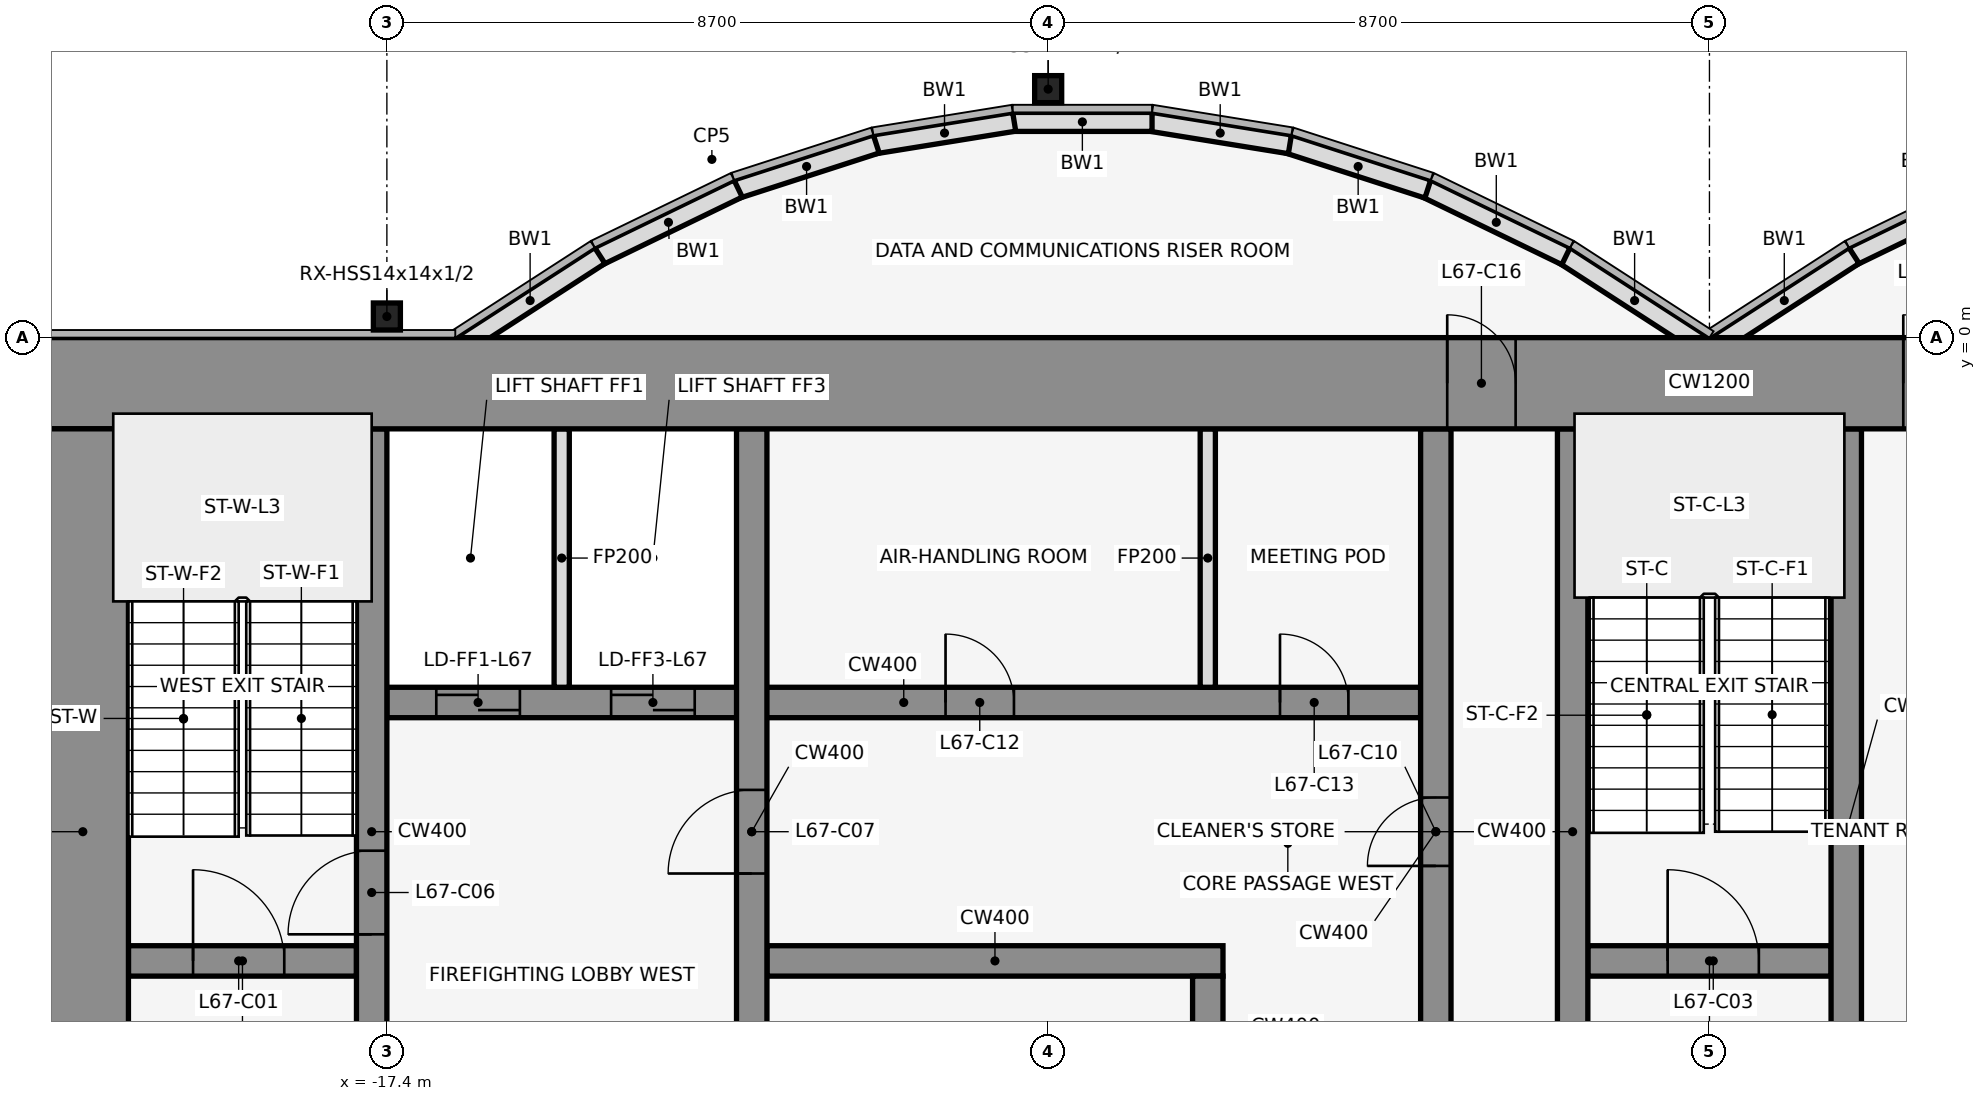
"""IFC4 building model, lengths in metres.
Left out: names, types, materials, properties, quantities, classifications, styles, units other than length and angle.
Written with IfcOpenShell. Run it as: python <this file> out.ifc"""

import sys

from ifc_helpers import new_model, si_unit, direction, frame, frame_2d, origin, origin_2d, place, context, subcontext, project, spatial, rectangle, hollow_rectangle, extrude, element, fill, save


model = new_model("IFC4")
c1 = context("Model", 3, precision=1e-05, world=origin(), true_north=direction((0.0, 1.0)))
c2 = subcontext(c1, "Body", "Model", "MODEL_VIEW")
j1 = project(units=[si_unit("LENGTHUNIT", "METRE"), si_unit("PLANEANGLEUNIT", "RADIAN")], contexts=[c1])
p1 = place(None, origin())
s1 = spatial("IfcSite", under=j1, at=p1, CompositionType="ELEMENT")
p2 = place(p1, origin())
s2 = spatial("IfcBuilding", under=s1, at=p2, CompositionType="ELEMENT")
p3 = place(p2, frame((0.0, 0.0, 297.5)))
s3 = spatial("IfcBuildingStorey", under=s2, at=p3, CompositionType="ELEMENT", Elevation=297.5)
for number, where, z_axis, x_axis in (
    (1, (-8.7, 3.269, 0.0), (0.0, 0.0, 1.0), (1.0, 0.0, 0.0)),
    (2, (-17.4, 0.278, 0.0), (0.0, 0.0, 1.0), (1.0, 0.0, 0.0)),
):
    element("IfcColumn", number, at=place(p3, frame(where, z_axis=z_axis, x_axis=x_axis)), inside=s3, PredefinedType="COLUMN", context=c2, shape_type="SweptSolid", body=[
        extrude(hollow_rectangle(XDim=0.356, YDim=0.356, WallThickness=0.012, at=origin_2d()), origin(), (0.0, 0.0, 1.0), 4.5),
    ])
p4 = place(p3, frame((3.721, 1.962, 0.0), z_axis=(0.0, 0.0, 1.0), x_axis=(-0.89982408427, -0.436252928206, 0.0)))
e3 = element("IfcWall", 3, at=p4, inside=s3, PredefinedType="STANDARD", context=c2, shape_type="SweptSolid", body=[
    extrude(rectangle(XDim=2.038, YDim=0.25, at=frame_2d((1.019, 0.0))), origin(), (0.0, 0.0, 1.0), 4.35),
])
for number, where, z_axis, x_axis in (
    (4, (1.901, 1.08, 0.0), (0.0, 0.0, 1.0), (-0.84, -0.543, 0.0)),
    (5, (-0.068, -0.105, 0.0), (0.0, 0.0, 1.0), (-0.84, 0.543, 0.0)),
):
    element("IfcWall", number, at=place(p3, frame(where, z_axis=z_axis, x_axis=x_axis)), inside=s3, PredefinedType="STANDARD", context=c2, shape_type="SweptSolid", body=[
        extrude(rectangle(XDim=2.183, YDim=0.25, at=frame_2d((1.091, 0.0))), origin(), (0.0, 0.0, 1.0), 4.35),
    ])
p5 = place(p3, frame((-1.888, 1.073, 0.0), z_axis=(0.0, 0.0, 1.0), x_axis=(-0.89982408427, 0.436252928206, 0.0)))
e6 = element("IfcWall", 6, at=p5, inside=s3, PredefinedType="STANDARD", context=c2, shape_type="SweptSolid", body=[
    extrude(rectangle(XDim=2.038, YDim=0.25, at=frame_2d((1.019, 0.0))), origin(), (0.0, 0.0, 1.0), 4.35),
])
p6 = place(p3, frame((-3.705, 1.955, 0.0), z_axis=(0.0, 0.0, 1.0), x_axis=(-0.951495806175, 0.307661714928, 0.0)))
e7 = element("IfcWall", 7, at=p6, inside=s3, PredefinedType="STANDARD", context=c2, shape_type="SweptSolid", body=[
    extrude(rectangle(XDim=1.927, YDim=0.25, at=frame_2d((0.963, 0.0))), origin(), (0.0, 0.0, 1.0), 4.35),
])
p7 = place(p3, frame((-5.52, 2.543, 0.0), z_axis=(0.0, 0.0, 1.0), x_axis=(-0.987181718931, 0.159600293885, 0.0)))
e8 = element("IfcWall", 8, at=p7, inside=s3, PredefinedType="STANDARD", context=c2, shape_type="SweptSolid", body=[
    extrude(rectangle(XDim=1.857, YDim=0.25, at=frame_2d((0.929, 0.0))), origin(), (0.0, 0.0, 1.0), 4.35),
])
p8 = place(p3, frame((-7.333, 2.838, 0.0), z_axis=(0.0, 0.0, 1.0), x_axis=(-1.0, 0.0, 0.0)))
e9 = element("IfcWall", 9, at=p8, inside=s3, PredefinedType="STANDARD", context=c2, shape_type="SweptSolid", body=[
    extrude(rectangle(XDim=1.833, YDim=0.25, at=frame_2d((0.917, 0.0))), origin(), (0.0, 0.0, 1.0), 4.35),
])
p9 = place(p3, frame((-9.147, 2.84, 0.0), z_axis=(0.0, 0.0, 1.0), x_axis=(-0.987181718931, -0.159600293885, 0.0)))
e10 = element("IfcWall", 10, at=p9, inside=s3, PredefinedType="STANDARD", context=c2, shape_type="SweptSolid", body=[
    extrude(rectangle(XDim=1.857, YDim=0.25, at=frame_2d((0.929, 0.0))), origin(), (0.0, 0.0, 1.0), 4.35),
])
p10 = place(p3, frame((-10.962, 2.548, 0.0), z_axis=(0.0, 0.0, 1.0), x_axis=(-0.951495806175, -0.307661714928, 0.0)))
e11 = element("IfcWall", 11, at=p10, inside=s3, PredefinedType="STANDARD", context=c2, shape_type="SweptSolid", body=[
    extrude(rectangle(XDim=1.927, YDim=0.25, at=frame_2d((0.963, 0.0))), origin(), (0.0, 0.0, 1.0), 4.35),
])
p11 = place(p3, frame((-12.779, 1.962, 0.0), z_axis=(0.0, 0.0, 1.0), x_axis=(-0.89982408427, -0.436252928206, 0.0)))
e12 = element("IfcWall", 12, at=p11, inside=s3, PredefinedType="STANDARD", context=c2, shape_type="SweptSolid", body=[
    extrude(rectangle(XDim=2.038, YDim=0.25, at=frame_2d((1.019, 0.0))), origin(), (0.0, 0.0, 1.0), 4.35),
])
p12 = place(p3, frame((-14.599, 1.08, 0.0), z_axis=(0.0, 0.0, 1.0), x_axis=(-0.83981312244, -0.542875602121, 0.0)))
e13 = element("IfcWall", 13, at=p12, inside=s3, PredefinedType="STANDARD", context=c2, shape_type="SweptSolid", body=[
    extrude(rectangle(XDim=2.183, YDim=0.25, at=frame_2d((1.091, 0.0))), origin(), (0.0, 0.0, 1.0), 4.35),
])
p13 = place(p3, frame((-20.8, -8.2, 0.0), z_axis=(0.0, 0.0, 1.0), x_axis=(1.0, 0.0, 0.0)))
e14 = element("IfcWall", 14, at=p13, inside=s3, PredefinedType="SHEAR", context=c2, shape_type="SweptSolid", body=[
    extrude(rectangle(XDim=3.0, YDim=0.4, at=frame_2d((1.5, 0.0))), origin(), (0.0, 0.0, 1.0), 4.5),
])
p14 = place(p13, frame((0.85, 0.0, 0.0)))
e15 = element("IfcOpeningElement", 15, at=p14, cuts=e14, PredefinedType="OPENING", context=c2, shape_type="SweptSolid", body=[
    extrude(rectangle(XDim=1.2, YDim=2.1, at=frame_2d((0.6, 1.05))), frame((0.0, 0.212, 0.0), z_axis=(0.0, -1.0, 0.0), x_axis=(1.0, 0.0, 0.0)), (0.0, 0.0, 1.0), 0.424),
])
p15 = place(p3, frame((-12.4, -8.2, 0.0), z_axis=(0.0, 0.0, 1.0), x_axis=(1.0, 0.0, 0.0)))
e16 = element("IfcWall", 16, at=p15, inside=s3, PredefinedType="SHEAR", context=c2, shape_type="SweptSolid", body=[
    extrude(rectangle(XDim=6.0, YDim=0.4, at=frame_2d((3.0, 0.0))), origin(), (0.0, 0.0, 1.0), 4.5),
])
p16 = place(p3, frame((-1.6, -8.2, 0.0), z_axis=(0.0, 0.0, 1.0), x_axis=(1.0, 0.0, 0.0)))
e17 = element("IfcWall", 17, at=p16, inside=s3, PredefinedType="SHEAR", context=c2, shape_type="SweptSolid", body=[
    extrude(rectangle(XDim=3.2, YDim=0.4, at=frame_2d((1.6, 0.0))), origin(), (0.0, 0.0, 1.0), 4.5),
])
p17 = place(p16, frame((1.05, 0.0, 0.0)))
e18 = element("IfcOpeningElement", 18, at=p17, cuts=e17, PredefinedType="OPENING", context=c2, shape_type="SweptSolid", body=[
    extrude(rectangle(XDim=1.2, YDim=2.1, at=frame_2d((0.6, 1.05))), frame((0.0, 0.212, 0.0), z_axis=(0.0, -1.0, 0.0), x_axis=(1.0, 0.0, 0.0)), (0.0, 0.0, 1.0), 0.424),
])
p18 = place(p3, frame((-17.4, -4.8, 0.0), z_axis=(0.0, 0.0, 1.0), x_axis=(1.0, 0.0, 0.0)))
e19 = element("IfcWall", 19, at=p18, inside=s3, PredefinedType="SHEAR", context=c2, shape_type="SweptSolid", body=[
    extrude(rectangle(XDim=13.6, YDim=0.4, at=frame_2d((6.8, 0.0))), origin(), (0.0, 0.0, 1.0), 4.5),
])
p19 = place(p18, frame((0.65, 0.0, 0.0)))
e20 = element("IfcOpeningElement", 20, at=p19, cuts=e19, PredefinedType="OPENING", context=c2, shape_type="SweptSolid", body=[
    extrude(rectangle(XDim=1.1, YDim=2.1, at=frame_2d((0.55, 1.05))), frame((0.0, 0.212, 0.0), z_axis=(0.0, -1.0, 0.0), x_axis=(1.0, 0.0, 0.0)), (0.0, 0.0, 1.0), 0.424),
])
p20 = place(p18, frame((2.95, 0.0, 0.0)))
e21 = element("IfcOpeningElement", 21, at=p20, cuts=e19, PredefinedType="OPENING", context=c2, shape_type="SweptSolid", body=[
    extrude(rectangle(XDim=1.1, YDim=2.1, at=frame_2d((0.55, 1.05))), frame((0.0, 0.212, 0.0), z_axis=(0.0, -1.0, 0.0), x_axis=(1.0, 0.0, 0.0)), (0.0, 0.0, 1.0), 0.424),
])
p21 = place(p18, frame((7.35, 0.0, 0.0)))
e22 = element("IfcOpeningElement", 22, at=p21, cuts=e19, PredefinedType="OPENING", context=c2, shape_type="SweptSolid", body=[
    extrude(rectangle(XDim=0.9, YDim=2.1, at=frame_2d((0.45, 1.05))), frame((0.0, 0.212, 0.0), z_axis=(0.0, -1.0, 0.0), x_axis=(1.0, 0.0, 0.0)), (0.0, 0.0, 1.0), 0.424),
])
p22 = place(p18, frame((11.75, 0.0, 0.0)))
e23 = element("IfcOpeningElement", 23, at=p22, cuts=e19, PredefinedType="OPENING", context=c2, shape_type="SweptSolid", body=[
    extrude(rectangle(XDim=0.9, YDim=2.1, at=frame_2d((0.45, 1.05))), frame((0.0, 0.212, 0.0), z_axis=(0.0, -1.0, 0.0), x_axis=(1.0, 0.0, 0.0)), (0.0, 0.0, 1.0), 0.424),
])
p23 = place(p3, frame((-17.6, -11.8, 0.0), z_axis=(0.0, 0.0, 1.0), x_axis=(0.0, 1.0, 0.0)))
e24 = element("IfcWall", 24, at=p23, inside=s3, PredefinedType="SHEAR", context=c2, shape_type="SweptSolid", body=[
    extrude(rectangle(XDim=10.6, YDim=0.4, at=frame_2d((5.3, 0.0))), origin(), (0.0, 0.0, 1.0), 4.5),
])
p24 = place(p23, frame((1.25, 0.0, 0.0)))
e25 = element("IfcOpeningElement", 25, at=p24, cuts=e24, PredefinedType="OPENING", context=c2, shape_type="SweptSolid", body=[
    extrude(rectangle(XDim=1.1, YDim=2.1, at=frame_2d((0.55, 1.05))), frame((0.0, 0.212, 0.0), z_axis=(0.0, -1.0, 0.0), x_axis=(1.0, 0.0, 0.0)), (0.0, 0.0, 1.0), 0.424),
])
p25 = place(p23, frame((3.95, 0.0, 0.0)))
e26 = element("IfcOpeningElement", 26, at=p25, cuts=e24, PredefinedType="OPENING", context=c2, shape_type="SweptSolid", body=[
    extrude(rectangle(XDim=1.1, YDim=2.1, at=frame_2d((0.55, 1.05))), frame((0.0, 0.212, 0.0), z_axis=(0.0, -1.0, 0.0), x_axis=(1.0, 0.0, 0.0)), (0.0, 0.0, 1.0), 0.424),
])
p26 = place(p3, frame((-15.1, -4.6, 0.0), z_axis=(0.0, 0.0, 1.0), x_axis=(0.0, 1.0, 0.0)))
e27 = element("IfcWall", 27, at=p26, inside=s3, PredefinedType="PARTITIONING", context=c2, shape_type="SweptSolid", body=[
    extrude(rectangle(XDim=3.4, YDim=0.2, at=frame_2d((1.7, 0.0))), origin(), (0.0, 0.0, 1.0), 3.418),
])
p27 = place(p3, frame((-12.6, -11.8, 0.0), z_axis=(0.0, 0.0, 1.0), x_axis=(0.0, 1.0, 0.0)))
e28 = element("IfcWall", 28, at=p27, inside=s3, PredefinedType="SHEAR", context=c2, shape_type="SweptSolid", body=[
    extrude(rectangle(XDim=10.6, YDim=0.4, at=frame_2d((5.3, 0.0))), origin(), (0.0, 0.0, 1.0), 4.5),
])
p28 = place(p27, frame((4.75, 0.0, 0.0)))
e29 = element("IfcOpeningElement", 29, at=p28, cuts=e28, PredefinedType="OPENING", context=c2, shape_type="SweptSolid", body=[
    extrude(rectangle(XDim=1.1, YDim=2.1, at=frame_2d((0.55, 1.05))), frame((0.0, 0.212, 0.0), z_axis=(0.0, -1.0, 0.0), x_axis=(1.0, 0.0, 0.0)), (0.0, 0.0, 1.0), 0.424),
])
p29 = place(p3, frame((-6.6, -11.8, 0.0), z_axis=(0.0, 0.0, 1.0), x_axis=(0.0, 1.0, 0.0)))
e30 = element("IfcWall", 30, at=p29, inside=s3, PredefinedType="SHEAR", context=c2, shape_type="SweptSolid", body=[
    extrude(rectangle(XDim=3.4, YDim=0.4, at=frame_2d((1.7, 0.0))), origin(), (0.0, 0.0, 1.0), 4.5),
])
p30 = place(p29, frame((1.25, 0.0, 0.0)))
e31 = element("IfcOpeningElement", 31, at=p30, cuts=e30, PredefinedType="OPENING", context=c2, shape_type="SweptSolid", body=[
    extrude(rectangle(XDim=0.9, YDim=2.1, at=frame_2d((0.45, 1.05))), frame((0.0, 0.212, 0.0), z_axis=(0.0, -1.0, 0.0), x_axis=(1.0, 0.0, 0.0)), (0.0, 0.0, 1.0), 0.424),
])
p31 = place(p3, frame((-6.6, -4.6, 0.0), z_axis=(0.0, 0.0, 1.0), x_axis=(0.0, 1.0, 0.0)))
e32 = element("IfcWall", 32, at=p31, inside=s3, PredefinedType="PARTITIONING", context=c2, shape_type="SweptSolid", body=[
    extrude(rectangle(XDim=3.4, YDim=0.2, at=frame_2d((1.7, 0.0))), origin(), (0.0, 0.0, 1.0), 3.418),
])
p32 = place(p3, frame((-3.6, -11.8, 0.0), z_axis=(0.0, 0.0, 1.0), x_axis=(0.0, 1.0, 0.0)))
e33 = element("IfcWall", 33, at=p32, inside=s3, PredefinedType="SHEAR", context=c2, shape_type="SweptSolid", body=[
    extrude(rectangle(XDim=10.6, YDim=0.4, at=frame_2d((5.3, 0.0))), origin(), (0.0, 0.0, 1.0), 4.5),
])
p33 = place(p32, frame((4.85, 0.0, 0.0)))
e34 = element("IfcOpeningElement", 34, at=p33, cuts=e33, PredefinedType="OPENING", context=c2, shape_type="SweptSolid", body=[
    extrude(rectangle(XDim=0.9, YDim=2.1, at=frame_2d((0.45, 1.05))), frame((0.0, 0.212, 0.0), z_axis=(0.0, -1.0, 0.0), x_axis=(1.0, 0.0, 0.0)), (0.0, 0.0, 1.0), 0.424),
])
for number, where, z_axis, x_axis in (
    (35, (-1.8, -11.8, 0.0), (0.0, 0.0, 1.0), (0.0, 1.0, 0.0)),
    (36, (1.8, -11.8, 0.0), (0.0, 0.0, 1.0), (0.0, 1.0, 0.0)),
):
    element("IfcWall", number, at=place(p3, frame(where, z_axis=z_axis, x_axis=x_axis)), inside=s3, PredefinedType="SHEAR", context=c2, shape_type="SweptSolid", body=[
        extrude(rectangle(XDim=10.6, YDim=0.4, at=frame_2d((5.3, 0.0))), origin(), (0.0, 0.0, 1.0), 4.5),
    ])
p34 = place(p3, frame((-22.0, -0.6, 0.0), z_axis=(0.0, 0.0, 1.0), x_axis=(1.0, 0.0, 0.0)))
e37 = element("IfcWall", 37, at=p34, inside=s3, PredefinedType="SHEAR", context=c2, shape_type="SweptSolid", body=[
    extrude(rectangle(XDim=44.0, YDim=1.2, at=frame_2d((22.0, 0.0))), origin(), (0.0, 0.0, 1.0), 4.5),
])
p35 = place(p34, frame((18.55, 0.0, 0.0)))
e38 = element("IfcOpeningElement", 38, at=p35, cuts=e37, PredefinedType="OPENING", context=c2, shape_type="SweptSolid", body=[
    extrude(rectangle(XDim=0.9, YDim=2.1, at=frame_2d((0.45, 1.05))), frame((0.0, 0.612, 0.0), z_axis=(0.0, -1.0, 0.0), x_axis=(1.0, 0.0, 0.0)), (0.0, 0.0, 1.0), 1.224),
])
p36 = place(p34, frame((24.55, 0.0, 0.0)))
e39 = element("IfcOpeningElement", 39, at=p36, cuts=e37, PredefinedType="OPENING", context=c2, shape_type="SweptSolid", body=[
    extrude(rectangle(XDim=0.9, YDim=2.1, at=frame_2d((0.45, 1.05))), frame((0.0, 0.612, 0.0), z_axis=(0.0, -1.0, 0.0), x_axis=(1.0, 0.0, 0.0)), (0.0, 0.0, 1.0), 1.224),
])
p37 = place(p3, frame((-21.4, -11.8, 0.0), z_axis=(0.0, 0.0, 1.0), x_axis=(0.0, 1.0, 0.0)))
e40 = element("IfcWall", 40, at=p37, inside=s3, PredefinedType="SHEAR", context=c2, shape_type="SweptSolid", body=[
    extrude(rectangle(XDim=10.6, YDim=1.2, at=frame_2d((5.3, 0.0))), origin(), (0.0, 0.0, 1.0), 4.5),
])
p38 = place(p14, origin())
e41 = element("IfcDoor", 41, at=p38, inside=s3, OperationType="SINGLE_SWING_LEFT", PredefinedType="DOOR", context=c2, shape_type="SweptSolid", body=[
    extrude(rectangle(XDim=1.2, YDim=2.1, at=frame_2d((0.6, 1.05))), frame((0.0, 0.025, 0.0), z_axis=(0.0, -1.0, 0.0), x_axis=(1.0, 0.0, 0.0)), (0.0, 0.0, 1.0), 0.05),
])
fill(e15, e41)
p39 = place(p17, origin())
e42 = element("IfcDoor", 42, at=p39, inside=s3, OperationType="SINGLE_SWING_LEFT", PredefinedType="DOOR", context=c2, shape_type="SweptSolid", body=[
    extrude(rectangle(XDim=1.2, YDim=2.1, at=frame_2d((0.6, 1.05))), frame((0.0, 0.025, 0.0), z_axis=(0.0, -1.0, 0.0), x_axis=(1.0, 0.0, 0.0)), (0.0, 0.0, 1.0), 0.05),
])
fill(e18, e42)
p40 = place(p19, origin())
e43 = element("IfcDoor", 43, at=p40, inside=s3, OperationType="DOUBLE_DOOR_SLIDING", PredefinedType="DOOR", context=c2, shape_type="SweptSolid", body=[
    extrude(rectangle(XDim=1.1, YDim=2.1, at=frame_2d((0.55, 1.05))), frame((0.0, 0.025, 0.0), z_axis=(0.0, -1.0, 0.0), x_axis=(1.0, 0.0, 0.0)), (0.0, 0.0, 1.0), 0.05),
])
fill(e20, e43)
p41 = place(p20, origin())
e44 = element("IfcDoor", 44, at=p41, inside=s3, OperationType="DOUBLE_DOOR_SLIDING", PredefinedType="DOOR", context=c2, shape_type="SweptSolid", body=[
    extrude(rectangle(XDim=1.1, YDim=2.1, at=frame_2d((0.55, 1.05))), frame((0.0, 0.025, 0.0), z_axis=(0.0, -1.0, 0.0), x_axis=(1.0, 0.0, 0.0)), (0.0, 0.0, 1.0), 0.05),
])
fill(e21, e44)
p42 = place(p25, frame((1.1, 0.0, 0.0), z_axis=(0.0, 0.0, 1.0), x_axis=(-1.0, 0.0, 0.0)))
e45 = element("IfcDoor", 45, at=p42, inside=s3, OperationType="SINGLE_SWING_LEFT", PredefinedType="DOOR", context=c2, shape_type="SweptSolid", body=[
    extrude(rectangle(XDim=1.1, YDim=2.1, at=frame_2d((0.55, 1.05))), frame((0.0, 0.025, 0.0), z_axis=(0.0, -1.0, 0.0), x_axis=(1.0, 0.0, 0.0)), (0.0, 0.0, 1.0), 0.05),
])
fill(e26, e45)
p43 = place(p28, origin())
e46 = element("IfcDoor", 46, at=p43, inside=s3, OperationType="SINGLE_SWING_LEFT", PredefinedType="DOOR", context=c2, shape_type="SweptSolid", body=[
    extrude(rectangle(XDim=1.1, YDim=2.1, at=frame_2d((0.55, 1.05))), frame((0.0, 0.025, 0.0), z_axis=(0.0, -1.0, 0.0), x_axis=(1.0, 0.0, 0.0)), (0.0, 0.0, 1.0), 0.05),
])
fill(e29, e46)
p44 = place(p33, frame((0.9, 0.0, 0.0), z_axis=(0.0, 0.0, 1.0), x_axis=(-1.0, 0.0, 0.0)))
e47 = element("IfcDoor", 47, at=p44, inside=s3, OperationType="SINGLE_SWING_LEFT", PredefinedType="DOOR", context=c2, shape_type="SweptSolid", body=[
    extrude(rectangle(XDim=0.9, YDim=2.1, at=frame_2d((0.45, 1.05))), frame((0.0, 0.025, 0.0), z_axis=(0.0, -1.0, 0.0), x_axis=(1.0, 0.0, 0.0)), (0.0, 0.0, 1.0), 0.05),
])
fill(e34, e47)
p45 = place(p21, origin())
e48 = element("IfcDoor", 48, at=p45, inside=s3, OperationType="SINGLE_SWING_RIGHT", PredefinedType="DOOR", context=c2, shape_type="SweptSolid", body=[
    extrude(rectangle(XDim=0.9, YDim=2.1, at=frame_2d((0.45, 1.05))), frame((0.0, 0.025, 0.0), z_axis=(0.0, -1.0, 0.0), x_axis=(1.0, 0.0, 0.0)), (0.0, 0.0, 1.0), 0.05),
])
fill(e22, e48)
p46 = place(p22, origin())
e49 = element("IfcDoor", 49, at=p46, inside=s3, OperationType="SINGLE_SWING_LEFT", PredefinedType="DOOR", context=c2, shape_type="SweptSolid", body=[
    extrude(rectangle(XDim=0.9, YDim=2.1, at=frame_2d((0.45, 1.05))), frame((0.0, 0.025, 0.0), z_axis=(0.0, -1.0, 0.0), x_axis=(1.0, 0.0, 0.0)), (0.0, 0.0, 1.0), 0.05),
])
fill(e23, e49)
p47 = place(p35, origin())
e50 = element("IfcDoor", 50, at=p47, inside=s3, OperationType="SINGLE_SWING_LEFT", PredefinedType="DOOR", context=c2, shape_type="SweptSolid", body=[
    extrude(rectangle(XDim=0.9, YDim=2.1, at=frame_2d((0.45, 1.05))), frame((0.0, 0.025, 0.0), z_axis=(0.0, -1.0, 0.0), x_axis=(1.0, 0.0, 0.0)), (0.0, 0.0, 1.0), 0.05),
])
fill(e38, e50)
p48 = place(p36, origin())
e51 = element("IfcDoor", 51, at=p48, inside=s3, OperationType="SINGLE_SWING_LEFT", PredefinedType="DOOR", context=c2, shape_type="SweptSolid", body=[
    extrude(rectangle(XDim=0.9, YDim=2.1, at=frame_2d((0.45, 1.05))), frame((0.0, 0.025, 0.0), z_axis=(0.0, -1.0, 0.0), x_axis=(1.0, 0.0, 0.0)), (0.0, 0.0, 1.0), 0.05),
])
fill(e39, e51)
save(model, sys.argv[1])
